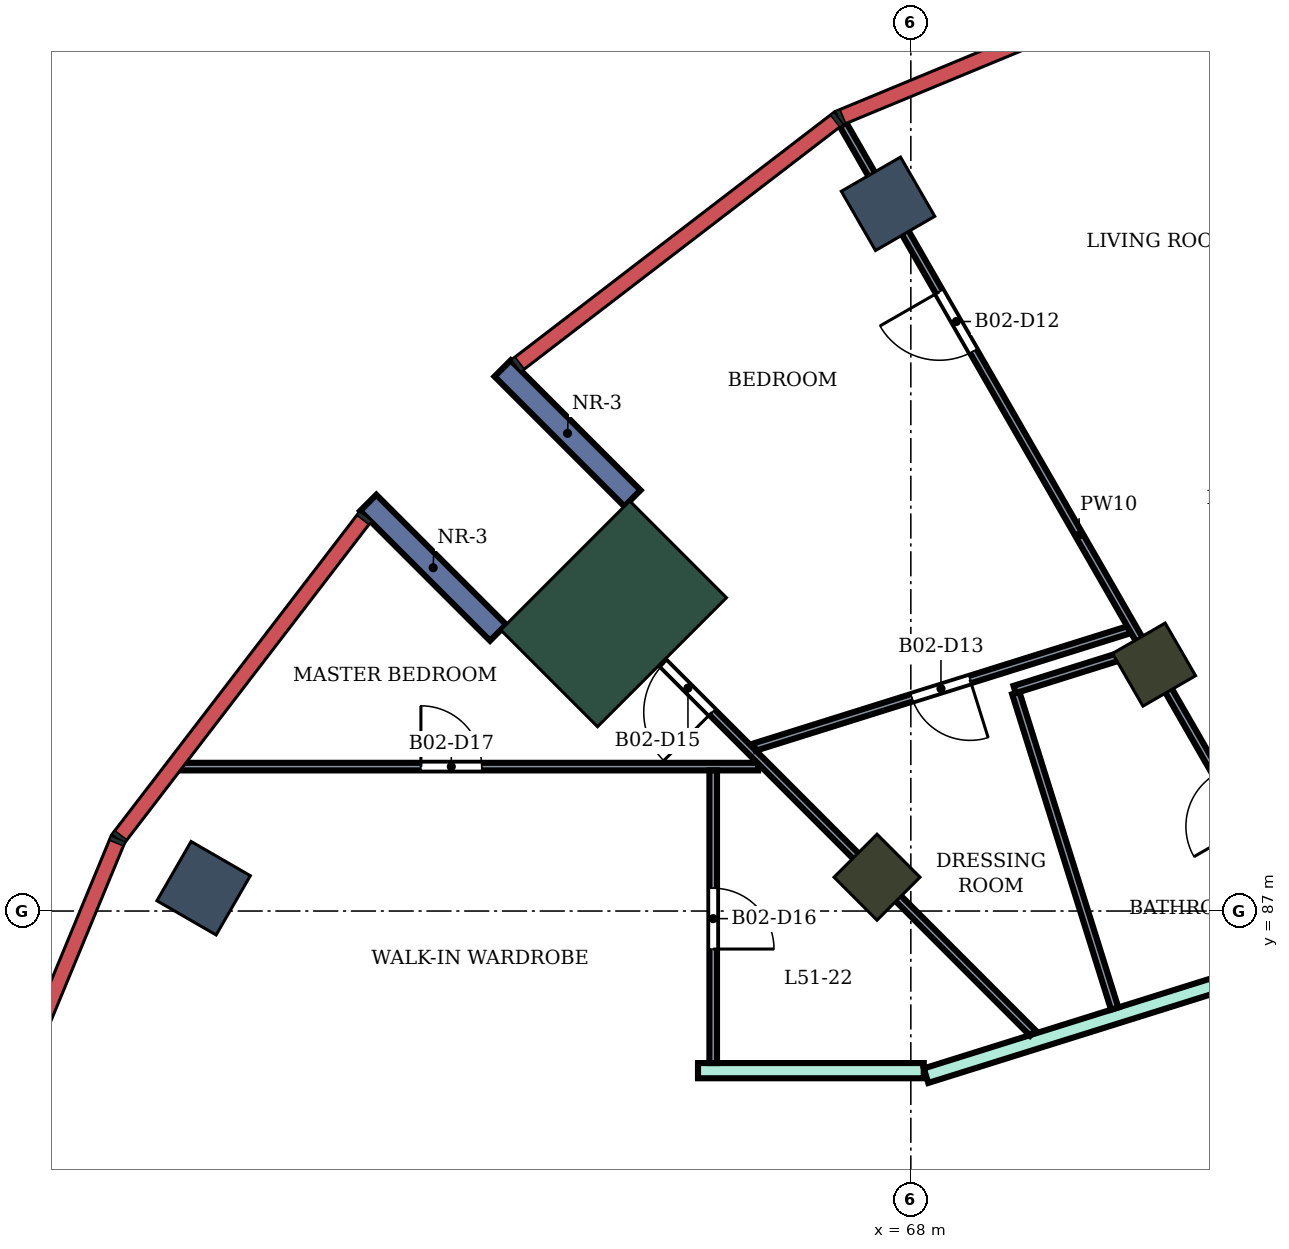
"""IFC4 building model, lengths in metres.
Left out: names, types, materials, properties, quantities, classifications, styles, units other than length and angle.
Written with IfcOpenShell. Run it as: python <this file> out.ifc"""

import sys

from ifc_helpers import new_model, si_unit, direction, frame, frame_2d, origin, origin_2d, place, context, subcontext, project, spatial, rectangle, extrude, element, fill, save


model = new_model("IFC4")
c1 = context("Model", 3, precision=1e-05, world=origin(), true_north=direction((0.0, 1.0)))
c2 = subcontext(c1, "Body", "Model", "MODEL_VIEW")
j1 = project(units=[si_unit("LENGTHUNIT", "METRE"), si_unit("PLANEANGLEUNIT", "RADIAN")], contexts=[c1])
p1 = place(None, origin())
s1 = spatial("IfcSite", under=j1, at=p1, CompositionType="ELEMENT")
p2 = place(p1, origin())
s2 = spatial("IfcBuilding", under=s1, at=p2, CompositionType="ELEMENT")
p3 = place(p2, frame((0.0, 0.0, 220.9)))
s3 = spatial("IfcBuildingStorey", under=s2, at=p3, CompositionType="ELEMENT", Elevation=220.9)
for number, where, z_axis, x_axis in (
    (1, (67.7, 96.304, 0.0), (0.0, 0.0, 1.0), (-0.5, 0.866, 0.0)),
    (2, (58.696, 87.3, 0.0), (0.0, 0.0, 1.0), (-0.866, 0.5, 0.0)),
):
    element("IfcColumn", number, at=place(p3, frame(where, z_axis=z_axis, x_axis=x_axis)), inside=s3, PredefinedType="COLUMN", context=c2, shape_type="SweptSolid", body=[
        extrude(rectangle(XDim=0.9, YDim=0.9, at=origin_2d()), origin(), (0.0, 0.0, 1.0), 4.2),
    ])
for number, where, z_axis, x_axis in (
    (3, (71.2, 90.242, 0.0), (0.0, 0.0, 1.0), (-0.5, 0.866, 0.0)),
    (4, (67.555, 87.445, 0.0), (0.0, 0.0, 1.0), (-0.707, 0.707, 0.0)),
):
    element("IfcColumn", number, at=place(p3, frame(where, z_axis=z_axis, x_axis=x_axis)), inside=s3, PredefinedType="COLUMN", context=c2, shape_type="SweptSolid", body=[
        extrude(rectangle(XDim=0.8, YDim=0.8, at=origin_2d()), origin(), (0.0, 0.0, 1.0), 4.2),
    ])
p4 = place(p3, frame((64.09, 90.91, 0.0), z_axis=(0.0, 0.0, 1.0), x_axis=(-0.707106781187, 0.707106781187, 0.0)))
e5 = element("IfcColumn", 5, at=p4, inside=s3, PredefinedType="COLUMN", context=c2, shape_type="SweptSolid", body=[
    extrude(rectangle(XDim=1.8, YDim=2.4, at=origin_2d()), origin(), (0.0, 0.0, 1.0), 4.2),
])
for number, where, z_axis, x_axis in (
    (6, (64.338, 92.43, 0.0), (0.0, 0.0, 1.0), (-0.707, 0.707, 0.0)),
    (7, (62.57, 90.662, 0.0), (0.0, 0.0, 1.0), (-0.707, 0.707, 0.0)),
):
    element("IfcWall", number, at=place(p3, frame(where, z_axis=z_axis, x_axis=x_axis)), inside=s3, PredefinedType="NOTDEFINED", context=c2, shape_type="SweptSolid", body=[
        extrude(rectangle(XDim=2.416, YDim=0.3, at=frame_2d((1.208, 0.0))), origin(), (0.0, 0.0, 1.0), 4.2),
    ])
p5 = place(p3, frame((65.2, 84.9, 0.0), z_axis=(0.0, 0.0, 1.0), x_axis=(1.0, 0.0, 0.0)))
e8 = element("IfcWall", 8, at=p5, inside=s3, PredefinedType="PARTITIONING", context=c2, shape_type="SweptSolid", body=[
    extrude(rectangle(XDim=2.97, YDim=0.2, at=frame_2d((1.485, 0.0))), origin(), (0.0, 0.0, 1.0), 3.75),
])
p6 = place(p3, frame((68.2, 84.834, 0.0), z_axis=(0.0, 0.0, 1.0), x_axis=(0.954260265251, 0.298977166624, 0.0)))
e9 = element("IfcWall", 9, at=p6, inside=s3, PredefinedType="PARTITIONING", context=c2, shape_type="SweptSolid", body=[
    extrude(rectangle(XDim=5.741, YDim=0.2, at=frame_2d((2.87, 0.0))), origin(), (0.0, 0.0, 1.0), 3.75),
])
p7 = place(p3, frame((58.379, 88.9, 0.0), z_axis=(0.0, 0.0, 1.0), x_axis=(1.0, 0.0, 0.0)))
e10 = element("IfcWall", 10, at=p7, inside=s3, PredefinedType="PARTITIONING", context=c2, shape_type="SweptSolid", body=[
    extrude(rectangle(XDim=7.612, YDim=0.1, at=frame_2d((3.806, 0.0))), origin(), (0.0, 0.0, 1.0), 3.75),
])
p8 = place(p7, frame((3.176, 0.0, 0.0)))
e11 = element("IfcOpeningElement", 11, at=p8, cuts=e10, PredefinedType="OPENING", context=c2, shape_type="SweptSolid", body=[
    extrude(rectangle(XDim=0.8, YDim=2.1, at=frame_2d((0.4, 1.05))), frame((0.0, 0.06, 0.0), z_axis=(0.0, -1.0, 0.0), x_axis=(1.0, 0.0, 0.0)), (0.0, 0.0, 1.0), 0.12),
])
p9 = place(p3, frame((63.596, 91.406, 0.0), z_axis=(0.0, 0.0, 1.0), x_axis=(0.70700623685, -0.707207311228, 0.0)))
e12 = element("IfcWall", 12, at=p9, inside=s3, PredefinedType="PARTITIONING", context=c2, shape_type="SweptSolid", body=[
    extrude(rectangle(XDim=8.499, YDim=0.1, at=frame_2d((4.25, 0.0))), origin(), (0.0, 0.0, 1.0), 3.75),
])
p10 = place(p9, frame((1.632, 0.0, 0.0)))
e13 = element("IfcOpeningElement", 13, at=p10, cuts=e12, PredefinedType="OPENING", context=c2, shape_type="SweptSolid", body=[
    extrude(rectangle(XDim=0.9, YDim=2.1, at=frame_2d((0.45, 1.05))), frame((0.0, 0.06, 0.0), z_axis=(0.0, -1.0, 0.0), x_axis=(1.0, 0.0, 0.0)), (0.0, 0.0, 1.0), 0.12),
])
p11 = place(p3, frame((65.4, 85.0, 0.0), z_axis=(0.0, 0.0, 1.0), x_axis=(0.0, 1.0, 0.0)))
e14 = element("IfcWall", 14, at=p11, inside=s3, PredefinedType="PARTITIONING", context=c2, shape_type="SweptSolid", body=[
    extrude(rectangle(XDim=3.85, YDim=0.1, at=frame_2d((1.925, 0.0))), origin(), (0.0, 0.0, 1.0), 3.75),
])
p12 = place(p11, frame((1.5, 0.0, 0.0)))
e15 = element("IfcOpeningElement", 15, at=p12, cuts=e14, PredefinedType="OPENING", context=c2, shape_type="SweptSolid", body=[
    extrude(rectangle(XDim=0.8, YDim=2.1, at=frame_2d((0.4, 1.05))), frame((0.0, 0.06, 0.0), z_axis=(0.0, -1.0, 0.0), x_axis=(1.0, 0.0, 0.0)), (0.0, 0.0, 1.0), 0.12),
])
p13 = place(p3, frame((65.944, 89.157, 0.0), z_axis=(0.0, 0.0, 1.0), x_axis=(0.954235485309, 0.299056246512, 0.0)))
e16 = element("IfcWall", 16, at=p13, inside=s3, PredefinedType="PARTITIONING", context=c2, shape_type="SweptSolid", body=[
    extrude(rectangle(XDim=5.159, YDim=0.1, at=frame_2d((2.58, 0.0))), origin(), (0.0, 0.0, 1.0), 3.75),
])
p14 = place(p13, frame((2.17, 0.0, 0.0)))
e17 = element("IfcOpeningElement", 17, at=p14, cuts=e16, PredefinedType="OPENING", context=c2, shape_type="SweptSolid", body=[
    extrude(rectangle(XDim=0.8, YDim=2.1, at=frame_2d((0.4, 1.05))), frame((0.0, 0.06, 0.0), z_axis=(0.0, -1.0, 0.0), x_axis=(1.0, 0.0, 0.0)), (0.0, 0.0, 1.0), 0.12),
])
p15 = place(p3, frame((67.109, 97.346, 0.0), z_axis=(0.0, 0.0, 1.0), x_axis=(0.498583439824, -0.866841711925, 0.0)))
e18 = element("IfcWall", 18, at=p15, inside=s3, PredefinedType="PARTITIONING", context=c2, shape_type="SweptSolid", body=[
    extrude(rectangle(XDim=12.456, YDim=0.1, at=frame_2d((6.228, 0.0))), origin(), (0.0, 0.0, 1.0), 3.75),
])
p16 = place(p15, frame((2.538, 0.0, 0.0)))
e19 = element("IfcOpeningElement", 19, at=p16, cuts=e18, PredefinedType="OPENING", context=c2, shape_type="SweptSolid", body=[
    extrude(rectangle(XDim=0.9, YDim=2.1, at=frame_2d((0.45, 1.05))), frame((0.0, 0.06, 0.0), z_axis=(0.0, -1.0, 0.0), x_axis=(1.0, 0.0, 0.0)), (0.0, 0.0, 1.0), 0.12),
])
p17 = place(p15, frame((9.85, 0.0, 0.0)))
e20 = element("IfcOpeningElement", 20, at=p17, cuts=e18, PredefinedType="OPENING", context=c2, shape_type="SweptSolid", body=[
    extrude(rectangle(XDim=0.8, YDim=2.1, at=frame_2d((0.4, 1.05))), frame((0.0, 0.06, 0.0), z_axis=(0.0, -1.0, 0.0), x_axis=(1.0, 0.0, 0.0)), (0.0, 0.0, 1.0), 0.12),
])
p18 = place(p3, frame((69.381, 89.867, 0.0), z_axis=(0.0, 0.0, 1.0), x_axis=(0.29908659099, -0.954225974856, 0.0)))
e21 = element("IfcWall", 21, at=p18, inside=s3, PredefinedType="PARTITIONING", context=c2, shape_type="SweptSolid", body=[
    extrude(rectangle(XDim=4.35, YDim=0.1, at=frame_2d((2.175, 0.0))), origin(), (0.0, 0.0, 1.0), 3.75),
])
p19 = place(p3, frame((69.366, 89.915, 0.0), z_axis=(0.0, 0.0, 1.0), x_axis=(0.954163830168, 0.299284789457, 0.0)))
e22 = element("IfcWall", 22, at=p19, inside=s3, PredefinedType="PARTITIONING", context=c2, shape_type="SweptSolid", body=[
    extrude(rectangle(XDim=1.734, YDim=0.1, at=frame_2d((0.867, 0.0))), origin(), (0.0, 0.0, 1.0), 3.75),
])
p20 = place(p16, frame((0.9, 0.0, 0.0), z_axis=(0.0, 0.0, 1.0), x_axis=(-1.0, 0.0, 0.0)))
e23 = element("IfcDoor", 23, at=p20, inside=s3, OperationType="SINGLE_SWING_RIGHT", PredefinedType="DOOR", context=c2, shape_type="SweptSolid", body=[
    extrude(rectangle(XDim=0.9, YDim=2.1, at=frame_2d((0.45, 1.05))), frame((0.0, 0.025, 0.0), z_axis=(0.0, -1.0, 0.0), x_axis=(1.0, 0.0, 0.0)), (0.0, 0.0, 1.0), 0.05),
])
fill(e19, e23)
p21 = place(p14, frame((0.8, 0.0, 0.0), z_axis=(0.0, 0.0, 1.0), x_axis=(-1.0, 0.0, 0.0)))
e24 = element("IfcDoor", 24, at=p21, inside=s3, OperationType="SINGLE_SWING_LEFT", PredefinedType="DOOR", context=c2, shape_type="SweptSolid", body=[
    extrude(rectangle(XDim=0.8, YDim=2.1, at=frame_2d((0.4, 1.05))), frame((0.0, 0.025, 0.0), z_axis=(0.0, -1.0, 0.0), x_axis=(1.0, 0.0, 0.0)), (0.0, 0.0, 1.0), 0.05),
])
fill(e17, e24)
p22 = place(p10, frame((0.9, 0.0, 0.0), z_axis=(0.0, 0.0, 1.0), x_axis=(-1.0, 0.0, 0.0)))
e25 = element("IfcDoor", 25, at=p22, inside=s3, OperationType="SINGLE_SWING_LEFT", PredefinedType="DOOR", context=c2, shape_type="SweptSolid", body=[
    extrude(rectangle(XDim=0.9, YDim=2.1, at=frame_2d((0.45, 1.05))), frame((0.0, 0.025, 0.0), z_axis=(0.0, -1.0, 0.0), x_axis=(1.0, 0.0, 0.0)), (0.0, 0.0, 1.0), 0.05),
])
fill(e13, e25)
p23 = place(p12, frame((0.8, 0.0, 0.0), z_axis=(0.0, 0.0, 1.0), x_axis=(-1.0, 0.0, 0.0)))
e26 = element("IfcDoor", 26, at=p23, inside=s3, OperationType="SINGLE_SWING_RIGHT", PredefinedType="DOOR", context=c2, shape_type="SweptSolid", body=[
    extrude(rectangle(XDim=0.8, YDim=2.1, at=frame_2d((0.4, 1.05))), frame((0.0, 0.025, 0.0), z_axis=(0.0, -1.0, 0.0), x_axis=(1.0, 0.0, 0.0)), (0.0, 0.0, 1.0), 0.05),
])
fill(e15, e26)
p24 = place(p8, origin())
e27 = element("IfcDoor", 27, at=p24, inside=s3, OperationType="SINGLE_SWING_LEFT", PredefinedType="DOOR", context=c2, shape_type="SweptSolid", body=[
    extrude(rectangle(XDim=0.8, YDim=2.1, at=frame_2d((0.4, 1.05))), frame((0.0, 0.025, 0.0), z_axis=(0.0, -1.0, 0.0), x_axis=(1.0, 0.0, 0.0)), (0.0, 0.0, 1.0), 0.05),
])
fill(e11, e27)
save(model, sys.argv[1])
